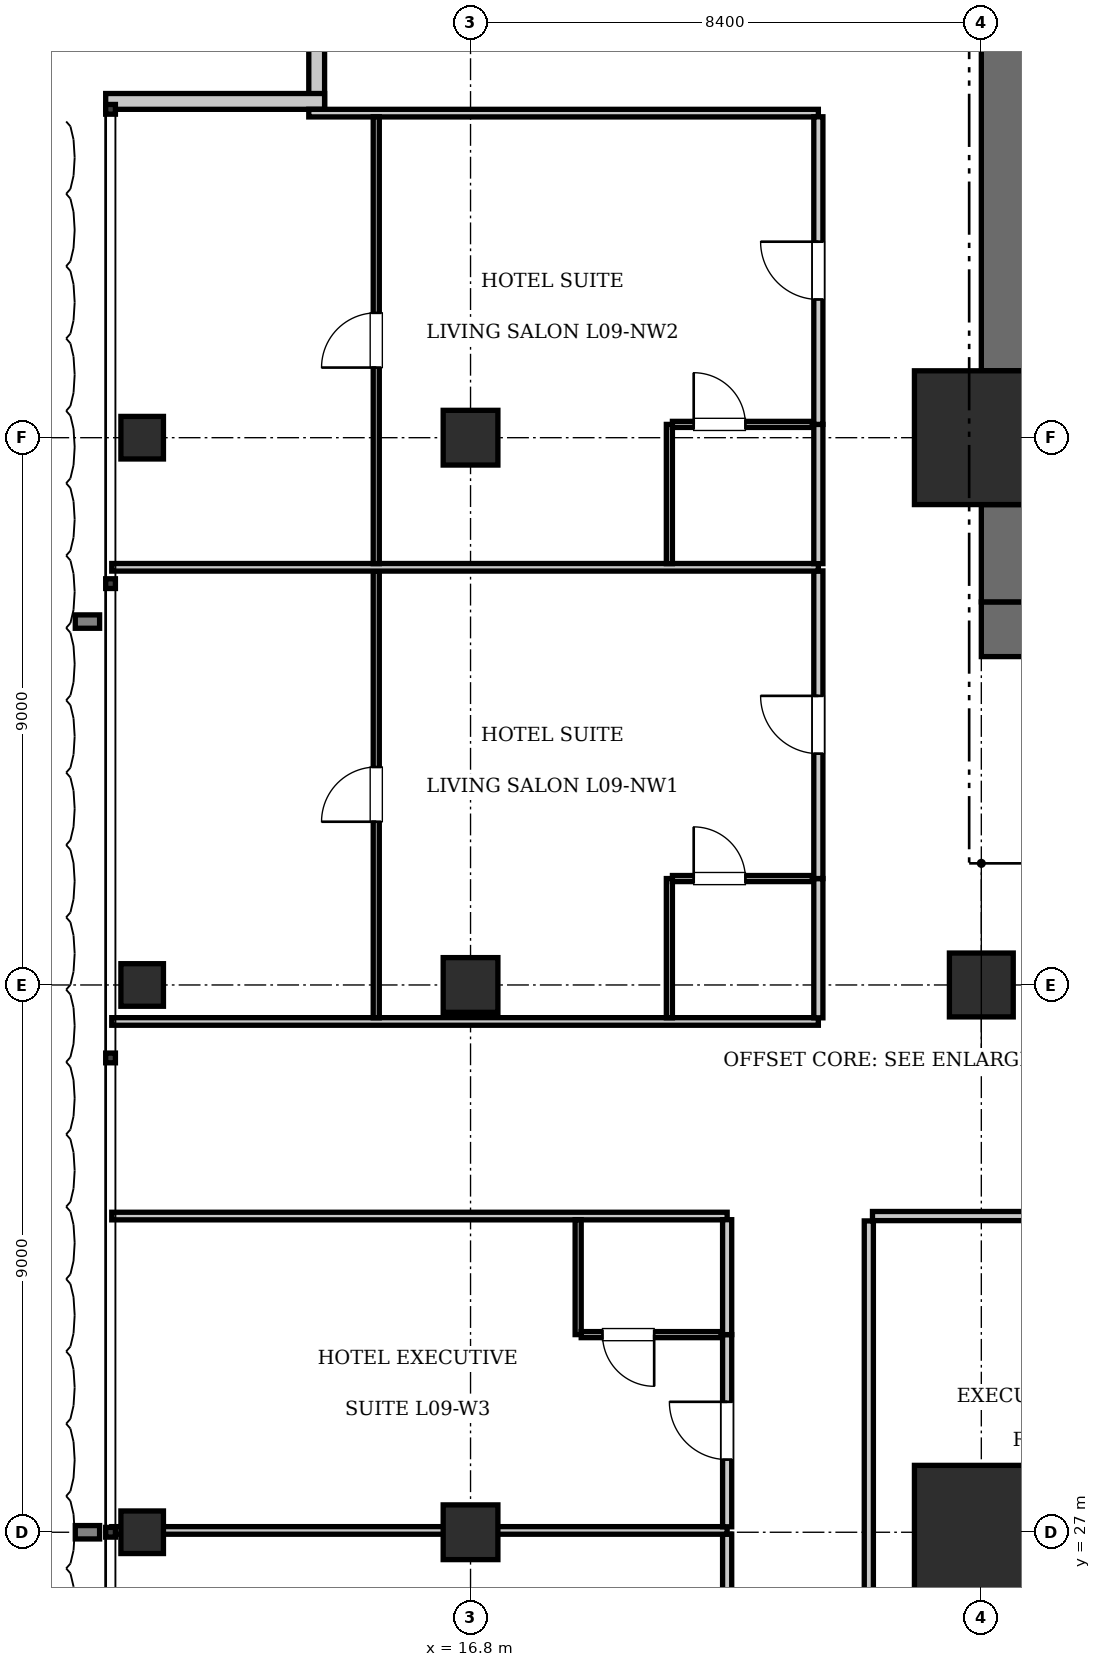
"""IFC4 building model, lengths in metres.
Left out: names, types, materials, properties, quantities, classifications, styles, units other than length and angle.
Written with IfcOpenShell. Run it as: python <this file> out.ifc"""

import sys

from ifc_helpers import new_model, si_unit, direction, frame, frame_2d, origin, origin_2d, place, context, subcontext, project, spatial, rectangle, i_section, extrude, element, fill, save


model = new_model("IFC4")
c1 = context("Model", 3, precision=1e-05, world=origin(), true_north=direction((0.0, 1.0)))
c2 = subcontext(c1, "Body", "Model", "MODEL_VIEW")
j1 = project(units=[si_unit("LENGTHUNIT", "METRE"), si_unit("PLANEANGLEUNIT", "RADIAN")], contexts=[c1])
p1 = place(None, origin())
s1 = spatial("IfcSite", under=j1, at=p1, CompositionType="ELEMENT")
p2 = place(p1, origin())
s2 = spatial("IfcBuilding", under=s1, at=p2, CompositionType="ELEMENT")
p3 = place(p2, frame((0.0, 0.0, 42.35)))
s3 = spatial("IfcBuildingStorey", under=s2, at=p3, CompositionType="ELEMENT", Elevation=42.35)
for number, where, z_axis, x_axis in (
    (1, (25.2, 27.0, 0.0), (0.0, 0.0, 1.0), (1.0, 0.0, 0.0)),
    (2, (25.2, 45.0, 0.0), (0.0, 0.0, 1.0), (1.0, 0.0, 0.0)),
):
    element("IfcColumn", number, at=place(p3, frame(where, z_axis=z_axis, x_axis=x_axis)), inside=s3, PredefinedType="COLUMN", context=c2, shape_type="SweptSolid", body=[
        extrude(rectangle(XDim=2.2, YDim=2.2, at=origin_2d()), origin(), (0.0, 0.0, 1.0), 3.85),
    ])
p4 = place(p3, frame((25.2, 41.85, 0.0), z_axis=(0.0, 0.0, 1.0), x_axis=(1.0, 0.0, 0.0)))
e3 = element("IfcWall", 3, at=p4, inside=s3, PredefinedType="SHEAR", context=c2, shape_type="SweptSolid", body=[
    extrude(rectangle(XDim=6.8, YDim=0.9, at=frame_2d((3.4, 0.0))), origin(), (0.0, 0.0, 1.0), 3.85),
])
p5 = place(p4, frame((1.65, 0.0, 0.0)))
e4 = element("IfcOpeningElement", 4, at=p5, cuts=e3, PredefinedType="OPENING", context=c2, shape_type="SweptSolid", body=[
    extrude(rectangle(XDim=1.15, YDim=2.15, at=frame_2d((0.575, 1.075))), frame((0.0, 0.46, 0.0), z_axis=(0.0, -1.0, 0.0), x_axis=(1.0, 0.0, 0.0)), (0.0, 0.0, 1.0), 0.92),
])
p6 = place(p4, frame((5.15, 0.0, 0.0)))
e5 = element("IfcOpeningElement", 5, at=p6, cuts=e3, PredefinedType="OPENING", context=c2, shape_type="SweptSolid", body=[
    extrude(rectangle(XDim=1.1, YDim=2.2, at=frame_2d((0.55, 1.1))), frame((0.0, 0.46, 0.0), z_axis=(0.0, -1.0, 0.0), x_axis=(1.0, 0.0, 0.0)), (0.0, 0.0, 1.0), 0.92),
])
p7 = place(p3, frame((25.65, 42.3, 0.0), z_axis=(0.0, 0.0, 1.0), x_axis=(0.0, 1.0, 0.0)))
e6 = element("IfcWall", 6, at=p7, inside=s3, PredefinedType="SHEAR", context=c2, shape_type="SweptSolid", body=[
    extrude(rectangle(XDim=1.6, YDim=0.9, at=frame_2d((0.8, 0.0))), origin(), (0.0, 0.0, 1.0), 3.85),
])
p8 = place(p3, frame((25.65, 46.1, 0.0), z_axis=(0.0, 0.0, 1.0), x_axis=(0.0, 1.0, 0.0)))
e7 = element("IfcWall", 7, at=p8, inside=s3, PredefinedType="SHEAR", context=c2, shape_type="SweptSolid", body=[
    extrude(rectangle(XDim=7.0, YDim=0.9, at=frame_2d((3.5, 0.0))), origin(), (0.0, 0.0, 1.0), 3.85),
])
p9 = place(p3, frame((25.2, 36.0, 0.0), z_axis=(0.0, 0.0, 1.0), x_axis=(1.0, 0.0, 0.0)))
e8 = element("IfcColumn", 8, at=p9, inside=s3, PredefinedType="COLUMN", context=c2, shape_type="SweptSolid", body=[
    extrude(rectangle(XDim=1.05, YDim=1.05, at=origin_2d()), origin(), (0.0, 0.0, 1.0), 3.85),
])
for number, where, z_axis, x_axis in (
    (9, (16.8, 27.0, 0.0), (0.0, 0.0, 1.0), (1.0, 0.0, 0.0)),
    (10, (16.8, 36.0, 0.0), (0.0, 0.0, 1.0), (1.0, 0.0, 0.0)),
    (11, (16.8, 45.0, 0.0), (0.0, 0.0, 1.0), (1.0, 0.0, 0.0)),
):
    element("IfcColumn", number, at=place(p3, frame(where, z_axis=z_axis, x_axis=x_axis)), inside=s3, PredefinedType="COLUMN", context=c2, shape_type="SweptSolid", body=[
        extrude(rectangle(XDim=0.9, YDim=0.9, at=origin_2d()), origin(), (0.0, 0.0, 1.0), 3.85),
    ])
for number, where, z_axis, x_axis in (
    (12, (11.4, 27.0, 0.0), (0.0, 0.0, 1.0), (1.0, 0.0, 0.0)),
    (13, (11.4, 36.0, 0.0), (0.0, 0.0, 1.0), (1.0, 0.0, 0.0)),
    (14, (11.4, 45.0, 0.0), (0.0, 0.0, 1.0), (1.0, 0.0, 0.0)),
):
    element("IfcColumn", number, at=place(p3, frame(where, z_axis=z_axis, x_axis=x_axis)), inside=s3, PredefinedType="COLUMN", context=c2, shape_type="SweptSolid", body=[
        extrude(i_section(OverallWidth=0.7, OverallDepth=0.7, WebThickness=0.028, FlangeThickness=0.044, at=origin_2d()), origin(), (0.0, 0.0, 1.0), 3.85),
    ])
p10 = place(p3, frame((14.27, 50.4, 0.0), z_axis=(0.0, 0.0, 1.0), x_axis=(0.0, 1.0, 0.0)))
e15 = element("IfcWall", 15, at=p10, inside=s3, PredefinedType="SOLIDWALL", context=c2, shape_type="SweptSolid", body=[
    extrude(rectangle(XDim=3.6, YDim=0.26, at=frame_2d((1.8, 0.0))), origin(), (0.0, 0.0, 1.0), 3.61),
])
p11 = place(p3, frame((10.8, 50.53, 0.0), z_axis=(0.0, 0.0, 1.0), x_axis=(1.0, 0.0, 0.0)))
e16 = element("IfcWall", 16, at=p11, inside=s3, PredefinedType="SOLIDWALL", context=c2, shape_type="SweptSolid", body=[
    extrude(rectangle(XDim=3.6, YDim=0.26, at=frame_2d((1.8, 0.0))), origin(), (0.0, 0.0, 1.0), 3.61),
])
p12 = place(p3, frame((23.35, 24.58, 0.0), z_axis=(0.0, 0.0, 1.0), x_axis=(0.0, 1.0, 0.0)))
e17 = element("IfcWall", 17, at=p12, inside=s3, PredefinedType="PARTITIONING", context=c2, shape_type="SweptSolid", body=[
    extrude(rectangle(XDim=7.54, YDim=0.15, at=frame_2d((3.77, 0.0))), origin(), (0.0, 0.0, 1.0), 3.61),
])
p13 = place(p3, frame((23.41, 32.2, 0.0), z_axis=(0.0, 0.0, 1.0), x_axis=(1.0, 0.0, 0.0)))
e18 = element("IfcWall", 18, at=p13, inside=s3, PredefinedType="PARTITIONING", context=c2, shape_type="SweptSolid", body=[
    extrude(rectangle(XDim=6.557, YDim=0.15, at=frame_2d((3.279, 0.0))), origin(), (0.0, 0.0, 1.0), 3.61),
])
p14 = place(p13, frame((2.829, 0.0, 0.0)))
e19 = element("IfcOpeningElement", 19, at=p14, cuts=e18, PredefinedType="OPENING", context=c2, shape_type="SweptSolid", body=[
    extrude(rectangle(XDim=0.9, YDim=2.1, at=frame_2d((0.45, 1.05))), frame((0.0, 0.085, 0.0), z_axis=(0.0, -1.0, 0.0), x_axis=(1.0, 0.0, 0.0)), (0.0, 0.0, 1.0), 0.17),
])
p15 = place(p3, frame((10.9, 32.2, 0.0), z_axis=(0.0, 0.0, 1.0), x_axis=(1.0, 0.0, 0.0)))
e20 = element("IfcWall", 20, at=p15, inside=s3, PredefinedType="PARTITIONING", context=c2, shape_type="SweptSolid", body=[
    extrude(rectangle(XDim=10.12, YDim=0.125, at=frame_2d((5.06, 0.0))), origin(), (0.0, 0.0, 1.0), 3.61),
])
p16 = place(p3, frame((21.02, 23.82, 0.0), z_axis=(0.0, 0.0, 1.0), x_axis=(0.0, 1.0, 0.0)))
e21 = element("IfcWall", 21, at=p16, inside=s3, PredefinedType="PARTITIONING", context=c2, shape_type="SweptSolid", body=[
    extrude(rectangle(XDim=3.15, YDim=0.15, at=frame_2d((1.575, 0.0))), origin(), (0.0, 0.0, 1.0), 3.352),
])
p17 = place(p16, frame((1.1, 0.0, 0.0)))
e22 = element("IfcOpeningElement", 22, at=p17, cuts=e21, PredefinedType="OPENING", context=c2, shape_type="SweptSolid", body=[
    extrude(rectangle(XDim=0.95, YDim=2.15, at=frame_2d((0.475, 1.075))), frame((0.0, 0.085, 0.0), z_axis=(0.0, -1.0, 0.0), x_axis=(1.0, 0.0, 0.0)), (0.0, 0.0, 1.0), 0.17),
])
p18 = place(p3, frame((10.9, 27.03, 0.0), z_axis=(0.0, 0.0, 1.0), x_axis=(1.0, 0.0, 0.0)))
e23 = element("IfcWall", 23, at=p18, inside=s3, PredefinedType="PARTITIONING", context=c2, shape_type="SweptSolid", body=[
    extrude(rectangle(XDim=10.12, YDim=0.125, at=frame_2d((5.06, 0.0))), origin(), (0.0, 0.0, 1.0), 2.988),
])
p19 = place(p3, frame((21.02, 27.09, 0.0), z_axis=(0.0, 0.0, 1.0), x_axis=(0.0, 1.0, 0.0)))
e24 = element("IfcWall", 24, at=p19, inside=s3, PredefinedType="PARTITIONING", context=c2, shape_type="SweptSolid", body=[
    extrude(rectangle(XDim=3.16, YDim=0.15, at=frame_2d((1.58, 0.0))), origin(), (0.0, 0.0, 1.0), 3.403),
])
p20 = place(p19, frame((1.105, 0.0, 0.0)))
e25 = element("IfcOpeningElement", 25, at=p20, cuts=e24, PredefinedType="OPENING", context=c2, shape_type="SweptSolid", body=[
    extrude(rectangle(XDim=0.95, YDim=2.15, at=frame_2d((0.475, 1.075))), frame((0.0, 0.085, 0.0), z_axis=(0.0, -1.0, 0.0), x_axis=(1.0, 0.0, 0.0)), (0.0, 0.0, 1.0), 0.17),
])
p21 = place(p3, frame((21.02, 30.25, 0.0), z_axis=(0.0, 0.0, 1.0), x_axis=(0.0, 1.0, 0.0)))
e26 = element("IfcWall", 26, at=p21, inside=s3, PredefinedType="PARTITIONING", context=c2, shape_type="SweptSolid", body=[
    extrude(rectangle(XDim=1.89, YDim=0.15, at=frame_2d((0.945, 0.0))), origin(), (0.0, 0.0, 1.0), 3.403),
])
p22 = place(p3, frame((18.57, 30.25, 0.0), z_axis=(0.0, 0.0, 1.0), x_axis=(0.0, 1.0, 0.0)))
e27 = element("IfcWall", 27, at=p22, inside=s3, PredefinedType="PARTITIONING", context=c2, shape_type="SweptSolid", body=[
    extrude(rectangle(XDim=1.89, YDim=0.1, at=frame_2d((0.945, 0.0))), origin(), (0.0, 0.0, 1.0), 3.61),
])
p23 = place(p3, frame((18.62, 30.25, 0.0), z_axis=(0.0, 0.0, 1.0), x_axis=(1.0, 0.0, 0.0)))
e28 = element("IfcWall", 28, at=p23, inside=s3, PredefinedType="PARTITIONING", context=c2, shape_type="SweptSolid", body=[
    extrude(rectangle(XDim=2.3, YDim=0.1, at=frame_2d((1.15, 0.0))), origin(), (0.0, 0.0, 1.0), 3.61),
])
p24 = place(p23, frame((0.35, 0.0, 0.0)))
e29 = element("IfcOpeningElement", 29, at=p24, cuts=e28, PredefinedType="OPENING", context=c2, shape_type="SweptSolid", body=[
    extrude(rectangle(XDim=0.85, YDim=2.1, at=frame_2d((0.425, 1.05))), frame((0.0, 0.06, 0.0), z_axis=(0.0, -1.0, 0.0), x_axis=(1.0, 0.0, 0.0)), (0.0, 0.0, 1.0), 0.12),
])
p25 = place(p3, frame((10.9, 35.4, 0.0), z_axis=(0.0, 0.0, 1.0), x_axis=(1.0, 0.0, 0.0)))
e30 = element("IfcWall", 30, at=p25, inside=s3, PredefinedType="PARTITIONING", context=c2, shape_type="SweptSolid", body=[
    extrude(rectangle(XDim=11.62, YDim=0.125, at=frame_2d((5.81, 0.0))), origin(), (0.0, 0.0, 1.0), 3.61),
])
p26 = place(p3, frame((14.14, 50.337, 0.0), z_axis=(0.0, 0.0, 1.0), x_axis=(1.0, 0.0, 0.0)))
e31 = element("IfcWall", 31, at=p26, inside=s3, PredefinedType="PARTITIONING", context=c2, shape_type="SweptSolid", body=[
    extrude(rectangle(XDim=8.38, YDim=0.125, at=frame_2d((4.19, 0.0))), origin(), (0.0, 0.0, 1.0), 3.61),
])
p27 = place(p3, frame((22.52, 35.46, 0.0), z_axis=(0.0, 0.0, 1.0), x_axis=(0.0, 1.0, 0.0)))
e32 = element("IfcWall", 32, at=p27, inside=s3, PredefinedType="PARTITIONING", context=c2, shape_type="SweptSolid", body=[
    extrude(rectangle(XDim=2.29, YDim=0.15, at=frame_2d((1.145, 0.0))), origin(), (0.0, 0.0, 1.0), 3.61),
])
p28 = place(p3, frame((22.52, 37.75, 0.0), z_axis=(0.0, 0.0, 1.0), x_axis=(0.0, 1.0, 0.0)))
e33 = element("IfcWall", 33, at=p28, inside=s3, PredefinedType="PARTITIONING", context=c2, shape_type="SweptSolid", body=[
    extrude(rectangle(XDim=5.059, YDim=0.15, at=frame_2d((2.529, 0.0))), origin(), (0.0, 0.0, 1.0), 3.61),
])
p29 = place(p28, frame((2.054, 0.0, 0.0)))
e34 = element("IfcOpeningElement", 34, at=p29, cuts=e33, PredefinedType="OPENING", context=c2, shape_type="SweptSolid", body=[
    extrude(rectangle(XDim=0.95, YDim=2.15, at=frame_2d((0.475, 1.075))), frame((0.0, 0.085, 0.0), z_axis=(0.0, -1.0, 0.0), x_axis=(1.0, 0.0, 0.0)), (0.0, 0.0, 1.0), 0.17),
])
p30 = place(p3, frame((20.07, 35.46, 0.0), z_axis=(0.0, 0.0, 1.0), x_axis=(0.0, 1.0, 0.0)))
e35 = element("IfcWall", 35, at=p30, inside=s3, PredefinedType="PARTITIONING", context=c2, shape_type="SweptSolid", body=[
    extrude(rectangle(XDim=2.29, YDim=0.1, at=frame_2d((1.145, 0.0))), origin(), (0.0, 0.0, 1.0), 3.61),
])
p31 = place(p3, frame((20.12, 37.75, 0.0), z_axis=(0.0, 0.0, 1.0), x_axis=(1.0, 0.0, 0.0)))
e36 = element("IfcWall", 36, at=p31, inside=s3, PredefinedType="PARTITIONING", context=c2, shape_type="SweptSolid", body=[
    extrude(rectangle(XDim=2.3, YDim=0.1, at=frame_2d((1.15, 0.0))), origin(), (0.0, 0.0, 1.0), 3.61),
])
p32 = place(p31, frame((0.35, 0.0, 0.0)))
e37 = element("IfcOpeningElement", 37, at=p32, cuts=e36, PredefinedType="OPENING", context=c2, shape_type="SweptSolid", body=[
    extrude(rectangle(XDim=0.85, YDim=2.1, at=frame_2d((0.425, 1.05))), frame((0.0, 0.06, 0.0), z_axis=(0.0, -1.0, 0.0), x_axis=(1.0, 0.0, 0.0)), (0.0, 0.0, 1.0), 0.12),
])
p33 = place(p3, frame((15.25, 35.46, 0.0), z_axis=(0.0, 0.0, 1.0), x_axis=(0.0, 1.0, 0.0)))
e38 = element("IfcWall", 38, at=p33, inside=s3, PredefinedType="PARTITIONING", context=c2, shape_type="SweptSolid", body=[
    extrude(rectangle(XDim=7.349, YDim=0.1, at=frame_2d((3.674, 0.0))), origin(), (0.0, 0.0, 1.0), 3.61),
])
p34 = place(p33, frame((3.224, 0.0, 0.0)))
e39 = element("IfcOpeningElement", 39, at=p34, cuts=e38, PredefinedType="OPENING", context=c2, shape_type="SweptSolid", body=[
    extrude(rectangle(XDim=0.9, YDim=2.1, at=frame_2d((0.45, 1.05))), frame((0.0, 0.06, 0.0), z_axis=(0.0, -1.0, 0.0), x_axis=(1.0, 0.0, 0.0)), (0.0, 0.0, 1.0), 0.12),
])
p35 = place(p3, frame((10.9, 42.869, 0.0), z_axis=(0.0, 0.0, 1.0), x_axis=(1.0, 0.0, 0.0)))
e40 = element("IfcWall", 40, at=p35, inside=s3, PredefinedType="PARTITIONING", context=c2, shape_type="SweptSolid", body=[
    extrude(rectangle(XDim=11.62, YDim=0.125, at=frame_2d((5.81, 0.0))), origin(), (0.0, 0.0, 1.0), 3.61),
])
p36 = place(p3, frame((22.52, 42.929, 0.0), z_axis=(0.0, 0.0, 1.0), x_axis=(0.0, 1.0, 0.0)))
e41 = element("IfcWall", 41, at=p36, inside=s3, PredefinedType="PARTITIONING", context=c2, shape_type="SweptSolid", body=[
    extrude(rectangle(XDim=2.29, YDim=0.15, at=frame_2d((1.145, 0.0))), origin(), (0.0, 0.0, 1.0), 3.61),
])
p37 = place(p3, frame((22.52, 45.219, 0.0), z_axis=(0.0, 0.0, 1.0), x_axis=(0.0, 1.0, 0.0)))
e42 = element("IfcWall", 42, at=p37, inside=s3, PredefinedType="PARTITIONING", context=c2, shape_type="SweptSolid", body=[
    extrude(rectangle(XDim=5.059, YDim=0.15, at=frame_2d((2.529, 0.0))), origin(), (0.0, 0.0, 1.0), 3.61),
])
p38 = place(p37, frame((2.054, 0.0, 0.0)))
e43 = element("IfcOpeningElement", 43, at=p38, cuts=e42, PredefinedType="OPENING", context=c2, shape_type="SweptSolid", body=[
    extrude(rectangle(XDim=0.95, YDim=2.15, at=frame_2d((0.475, 1.075))), frame((0.0, 0.085, 0.0), z_axis=(0.0, -1.0, 0.0), x_axis=(1.0, 0.0, 0.0)), (0.0, 0.0, 1.0), 0.17),
])
p39 = place(p3, frame((20.07, 42.929, 0.0), z_axis=(0.0, 0.0, 1.0), x_axis=(0.0, 1.0, 0.0)))
e44 = element("IfcWall", 44, at=p39, inside=s3, PredefinedType="PARTITIONING", context=c2, shape_type="SweptSolid", body=[
    extrude(rectangle(XDim=2.29, YDim=0.1, at=frame_2d((1.145, 0.0))), origin(), (0.0, 0.0, 1.0), 3.61),
])
p40 = place(p3, frame((20.12, 45.219, 0.0), z_axis=(0.0, 0.0, 1.0), x_axis=(1.0, 0.0, 0.0)))
e45 = element("IfcWall", 45, at=p40, inside=s3, PredefinedType="PARTITIONING", context=c2, shape_type="SweptSolid", body=[
    extrude(rectangle(XDim=2.3, YDim=0.1, at=frame_2d((1.15, 0.0))), origin(), (0.0, 0.0, 1.0), 3.61),
])
p41 = place(p40, frame((0.35, 0.0, 0.0)))
e46 = element("IfcOpeningElement", 46, at=p41, cuts=e45, PredefinedType="OPENING", context=c2, shape_type="SweptSolid", body=[
    extrude(rectangle(XDim=0.85, YDim=2.1, at=frame_2d((0.425, 1.05))), frame((0.0, 0.06, 0.0), z_axis=(0.0, -1.0, 0.0), x_axis=(1.0, 0.0, 0.0)), (0.0, 0.0, 1.0), 0.12),
])
p42 = place(p3, frame((15.25, 42.929, 0.0), z_axis=(0.0, 0.0, 1.0), x_axis=(0.0, 1.0, 0.0)))
e47 = element("IfcWall", 47, at=p42, inside=s3, PredefinedType="PARTITIONING", context=c2, shape_type="SweptSolid", body=[
    extrude(rectangle(XDim=7.349, YDim=0.1, at=frame_2d((3.674, 0.0))), origin(), (0.0, 0.0, 1.0), 3.61),
])
p43 = place(p42, frame((3.224, 0.0, 0.0)))
e48 = element("IfcOpeningElement", 48, at=p43, cuts=e47, PredefinedType="OPENING", context=c2, shape_type="SweptSolid", body=[
    extrude(rectangle(XDim=0.9, YDim=2.1, at=frame_2d((0.45, 1.05))), frame((0.0, 0.06, 0.0), z_axis=(0.0, -1.0, 0.0), x_axis=(1.0, 0.0, 0.0)), (0.0, 0.0, 1.0), 0.12),
])
p44 = place(p24, frame((0.85, 0.0, 0.0), z_axis=(0.0, 0.0, 1.0), x_axis=(-1.0, 0.0, 0.0)))
e49 = element("IfcDoor", 49, at=p44, inside=s3, OperationType="SINGLE_SWING_LEFT", PredefinedType="DOOR", context=c2, shape_type="SweptSolid", body=[
    extrude(rectangle(XDim=0.85, YDim=2.1, at=frame_2d((0.425, 1.05))), frame((0.0, 0.025, 0.0), z_axis=(0.0, -1.0, 0.0), x_axis=(1.0, 0.0, 0.0)), (0.0, 0.0, 1.0), 0.05),
])
fill(e29, e49)
p45 = place(p20, origin())
e50 = element("IfcDoor", 50, at=p45, inside=s3, OperationType="SINGLE_SWING_RIGHT", PredefinedType="DOOR", context=c2, shape_type="SweptSolid", body=[
    extrude(rectangle(XDim=0.95, YDim=2.15, at=frame_2d((0.475, 1.075))), frame((0.0, 0.025, 0.0), z_axis=(0.0, -1.0, 0.0), x_axis=(1.0, 0.0, 0.0)), (0.0, 0.0, 1.0), 0.05),
])
fill(e25, e50)
p46 = place(p32, origin())
e51 = element("IfcDoor", 51, at=p46, inside=s3, OperationType="SINGLE_SWING_LEFT", PredefinedType="DOOR", context=c2, shape_type="SweptSolid", body=[
    extrude(rectangle(XDim=0.85, YDim=2.1, at=frame_2d((0.425, 1.05))), frame((0.0, 0.025, 0.0), z_axis=(0.0, -1.0, 0.0), x_axis=(1.0, 0.0, 0.0)), (0.0, 0.0, 1.0), 0.05),
])
fill(e37, e51)
p47 = place(p29, origin())
e52 = element("IfcDoor", 52, at=p47, inside=s3, OperationType="SINGLE_SWING_RIGHT", PredefinedType="DOOR", context=c2, shape_type="SweptSolid", body=[
    extrude(rectangle(XDim=0.95, YDim=2.15, at=frame_2d((0.475, 1.075))), frame((0.0, 0.025, 0.0), z_axis=(0.0, -1.0, 0.0), x_axis=(1.0, 0.0, 0.0)), (0.0, 0.0, 1.0), 0.05),
])
fill(e34, e52)
p48 = place(p34, origin())
e53 = element("IfcDoor", 53, at=p48, inside=s3, OperationType="SINGLE_SWING_LEFT", PredefinedType="DOOR", context=c2, shape_type="SweptSolid", body=[
    extrude(rectangle(XDim=0.9, YDim=2.1, at=frame_2d((0.45, 1.05))), frame((0.0, 0.025, 0.0), z_axis=(0.0, -1.0, 0.0), x_axis=(1.0, 0.0, 0.0)), (0.0, 0.0, 1.0), 0.05),
])
fill(e39, e53)
p49 = place(p41, origin())
e54 = element("IfcDoor", 54, at=p49, inside=s3, OperationType="SINGLE_SWING_LEFT", PredefinedType="DOOR", context=c2, shape_type="SweptSolid", body=[
    extrude(rectangle(XDim=0.85, YDim=2.1, at=frame_2d((0.425, 1.05))), frame((0.0, 0.025, 0.0), z_axis=(0.0, -1.0, 0.0), x_axis=(1.0, 0.0, 0.0)), (0.0, 0.0, 1.0), 0.05),
])
fill(e46, e54)
p50 = place(p38, origin())
e55 = element("IfcDoor", 55, at=p50, inside=s3, OperationType="SINGLE_SWING_RIGHT", PredefinedType="DOOR", context=c2, shape_type="SweptSolid", body=[
    extrude(rectangle(XDim=0.95, YDim=2.15, at=frame_2d((0.475, 1.075))), frame((0.0, 0.025, 0.0), z_axis=(0.0, -1.0, 0.0), x_axis=(1.0, 0.0, 0.0)), (0.0, 0.0, 1.0), 0.05),
])
fill(e43, e55)
p51 = place(p43, origin())
e56 = element("IfcDoor", 56, at=p51, inside=s3, OperationType="SINGLE_SWING_LEFT", PredefinedType="DOOR", context=c2, shape_type="SweptSolid", body=[
    extrude(rectangle(XDim=0.9, YDim=2.1, at=frame_2d((0.45, 1.05))), frame((0.0, 0.025, 0.0), z_axis=(0.0, -1.0, 0.0), x_axis=(1.0, 0.0, 0.0)), (0.0, 0.0, 1.0), 0.05),
])
fill(e48, e56)
save(model, sys.argv[1])
